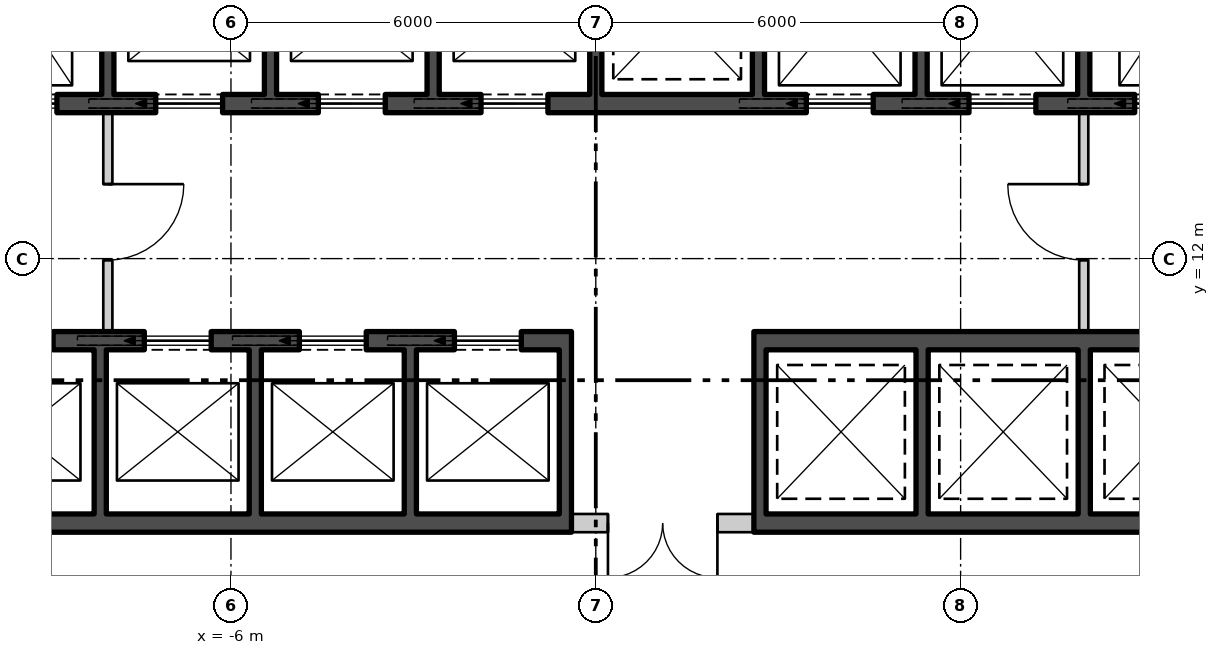
"""IFC4 building model, lengths in metres.
Left out: names, types, materials, properties, quantities, classifications, styles, units other than length and angle.
Written with IfcOpenShell. Run it as: python <this file> out.ifc"""

import sys

from ifc_helpers import new_model, si_unit, direction, frame, frame_2d, origin, place, context, subcontext, project, spatial, polyline, rectangle, outline, extrude, element, fill, save


model = new_model("IFC4")
c1 = context("Model", 3, precision=1e-05, world=origin(), true_north=direction((0.0, 1.0)))
c2 = subcontext(c1, "Body", "Model", "MODEL_VIEW")
j1 = project(units=[si_unit("LENGTHUNIT", "METRE"), si_unit("PLANEANGLEUNIT", "RADIAN")], contexts=[c1])
p1 = place(None, origin())
s1 = spatial("IfcSite", under=j1, at=p1, CompositionType="ELEMENT")
p2 = place(p1, origin())
s2 = spatial("IfcBuilding", under=s1, at=p2, CompositionType="ELEMENT")
p3 = place(p2, frame((0.0, 0.0, 46.8)))
s3 = spatial("IfcBuildingStorey", under=s2, at=p3, CompositionType="ELEMENT", Elevation=46.8)
p4 = place(p3, frame((-28.445, 10.319, -0.18), z_axis=(0.0, 0.0, 1.0), x_axis=(0.499999764979, -0.866025539474, 0.0)))
e1 = element("IfcWall", 1, at=p4, inside=s3, PredefinedType="SOLIDWALL", context=c2, shape_type="SweptSolid", body=[
    extrude(outline(polyline([(-0.13, -0.225), (45.87, -0.225), (45.61, 0.225), (0.13, 0.225), (-0.13, -0.225)])), origin(), (0.0, 0.0, 1.0), 4.28),
])
p5 = place(p4, frame((1.424, 0.0, 1.08)))
e2 = element("IfcOpeningElement", 2, at=p5, cuts=e1, PredefinedType="OPENING", context=c2, shape_type="SweptSolid", body=[
    extrude(rectangle(XDim=2.4, YDim=2.6, at=frame_2d((1.2, 1.3))), frame((0.0, 0.235, 0.0), z_axis=(0.0, -1.0, 0.0), x_axis=(1.0, 0.0, 0.0)), (0.0, 0.0, 1.0), 0.47),
])
p6 = place(p4, frame((5.893, 0.0, 1.08)))
e3 = element("IfcOpeningElement", 3, at=p6, cuts=e1, PredefinedType="OPENING", context=c2, shape_type="SweptSolid", body=[
    extrude(rectangle(XDim=2.4, YDim=2.6, at=frame_2d((1.2, 1.3))), frame((0.0, 0.235, 0.0), z_axis=(0.0, -1.0, 0.0), x_axis=(1.0, 0.0, 0.0)), (0.0, 0.0, 1.0), 0.47),
])
p7 = place(p4, frame((10.401, 0.0, 1.08)))
e4 = element("IfcOpeningElement", 4, at=p7, cuts=e1, PredefinedType="OPENING", context=c2, shape_type="SweptSolid", body=[
    extrude(rectangle(XDim=2.4, YDim=2.6, at=frame_2d((1.2, 1.3))), frame((0.0, 0.235, 0.0), z_axis=(0.0, -1.0, 0.0), x_axis=(1.0, 0.0, 0.0)), (0.0, 0.0, 1.0), 0.47),
])
p8 = place(p4, frame((14.909, 0.0, 1.08)))
e5 = element("IfcOpeningElement", 5, at=p8, cuts=e1, PredefinedType="OPENING", context=c2, shape_type="SweptSolid", body=[
    extrude(rectangle(XDim=2.4, YDim=2.6, at=frame_2d((1.2, 1.3))), frame((0.0, 0.235, 0.0), z_axis=(0.0, -1.0, 0.0), x_axis=(1.0, 0.0, 0.0)), (0.0, 0.0, 1.0), 0.47),
])
p9 = place(p4, frame((19.416, 0.0, 1.08)))
e6 = element("IfcOpeningElement", 6, at=p9, cuts=e1, PredefinedType="OPENING", context=c2, shape_type="SweptSolid", body=[
    extrude(rectangle(XDim=2.4, YDim=2.6, at=frame_2d((1.2, 1.3))), frame((0.0, 0.235, 0.0), z_axis=(0.0, -1.0, 0.0), x_axis=(1.0, 0.0, 0.0)), (0.0, 0.0, 1.0), 0.47),
])
p10 = place(p4, frame((23.924, 0.0, 1.08)))
e7 = element("IfcOpeningElement", 7, at=p10, cuts=e1, PredefinedType="OPENING", context=c2, shape_type="SweptSolid", body=[
    extrude(rectangle(XDim=2.4, YDim=2.6, at=frame_2d((1.2, 1.3))), frame((0.0, 0.235, 0.0), z_axis=(0.0, -1.0, 0.0), x_axis=(1.0, 0.0, 0.0)), (0.0, 0.0, 1.0), 0.47),
])
p11 = place(p4, frame((28.431, 0.0, 1.08)))
e8 = element("IfcOpeningElement", 8, at=p11, cuts=e1, PredefinedType="OPENING", context=c2, shape_type="SweptSolid", body=[
    extrude(rectangle(XDim=2.4, YDim=2.6, at=frame_2d((1.2, 1.3))), frame((0.0, 0.235, 0.0), z_axis=(0.0, -1.0, 0.0), x_axis=(1.0, 0.0, 0.0)), (0.0, 0.0, 1.0), 0.47),
])
p12 = place(p4, frame((32.939, 0.0, 1.08)))
e9 = element("IfcOpeningElement", 9, at=p12, cuts=e1, PredefinedType="OPENING", context=c2, shape_type="SweptSolid", body=[
    extrude(rectangle(XDim=2.4, YDim=2.6, at=frame_2d((1.2, 1.3))), frame((0.0, 0.235, 0.0), z_axis=(0.0, -1.0, 0.0), x_axis=(1.0, 0.0, 0.0)), (0.0, 0.0, 1.0), 0.47),
])
p13 = place(p4, frame((37.447, 0.0, 1.08)))
e10 = element("IfcOpeningElement", 10, at=p13, cuts=e1, PredefinedType="OPENING", context=c2, shape_type="SweptSolid", body=[
    extrude(rectangle(XDim=2.4, YDim=2.6, at=frame_2d((1.2, 1.3))), frame((0.0, 0.235, 0.0), z_axis=(0.0, -1.0, 0.0), x_axis=(1.0, 0.0, 0.0)), (0.0, 0.0, 1.0), 0.47),
])
p14 = place(p4, frame((41.916, 0.0, 1.08)))
e11 = element("IfcOpeningElement", 11, at=p14, cuts=e1, PredefinedType="OPENING", context=c2, shape_type="SweptSolid", body=[
    extrude(rectangle(XDim=2.4, YDim=2.6, at=frame_2d((1.2, 1.3))), frame((0.0, 0.235, 0.0), z_axis=(0.0, -1.0, 0.0), x_axis=(1.0, 0.0, 0.0)), (0.0, 0.0, 1.0), 0.47),
])
p15 = place(p3, frame((5.575, -29.294, -0.18), z_axis=(0.0, 0.0, 1.0), x_axis=(0.499999764979, 0.866025539474, 0.0)))
e12 = element("IfcWall", 12, at=p15, inside=s3, PredefinedType="SOLIDWALL", context=c2, shape_type="SweptSolid", body=[
    extrude(outline(polyline([(-0.13, -0.225), (45.87, -0.225), (45.61, 0.225), (0.13, 0.225), (-0.13, -0.225)])), origin(), (0.0, 0.0, 1.0), 4.28),
])
p16 = place(p15, frame((1.424, 0.0, 1.08)))
e13 = element("IfcOpeningElement", 13, at=p16, cuts=e12, PredefinedType="OPENING", context=c2, shape_type="SweptSolid", body=[
    extrude(rectangle(XDim=2.4, YDim=2.6, at=frame_2d((1.2, 1.3))), frame((0.0, 0.235, 0.0), z_axis=(0.0, -1.0, 0.0), x_axis=(1.0, 0.0, 0.0)), (0.0, 0.0, 1.0), 0.47),
])
p17 = place(p15, frame((5.893, 0.0, 1.08)))
e14 = element("IfcOpeningElement", 14, at=p17, cuts=e12, PredefinedType="OPENING", context=c2, shape_type="SweptSolid", body=[
    extrude(rectangle(XDim=2.4, YDim=2.6, at=frame_2d((1.2, 1.3))), frame((0.0, 0.235, 0.0), z_axis=(0.0, -1.0, 0.0), x_axis=(1.0, 0.0, 0.0)), (0.0, 0.0, 1.0), 0.47),
])
p18 = place(p15, frame((10.401, 0.0, 1.08)))
e15 = element("IfcOpeningElement", 15, at=p18, cuts=e12, PredefinedType="OPENING", context=c2, shape_type="SweptSolid", body=[
    extrude(rectangle(XDim=2.4, YDim=2.6, at=frame_2d((1.2, 1.3))), frame((0.0, 0.235, 0.0), z_axis=(0.0, -1.0, 0.0), x_axis=(1.0, 0.0, 0.0)), (0.0, 0.0, 1.0), 0.47),
])
p19 = place(p15, frame((14.909, 0.0, 1.08)))
e16 = element("IfcOpeningElement", 16, at=p19, cuts=e12, PredefinedType="OPENING", context=c2, shape_type="SweptSolid", body=[
    extrude(rectangle(XDim=2.4, YDim=2.6, at=frame_2d((1.2, 1.3))), frame((0.0, 0.235, 0.0), z_axis=(0.0, -1.0, 0.0), x_axis=(1.0, 0.0, 0.0)), (0.0, 0.0, 1.0), 0.47),
])
p20 = place(p15, frame((19.416, 0.0, 1.08)))
e17 = element("IfcOpeningElement", 17, at=p20, cuts=e12, PredefinedType="OPENING", context=c2, shape_type="SweptSolid", body=[
    extrude(rectangle(XDim=2.4, YDim=2.6, at=frame_2d((1.2, 1.3))), frame((0.0, 0.235, 0.0), z_axis=(0.0, -1.0, 0.0), x_axis=(1.0, 0.0, 0.0)), (0.0, 0.0, 1.0), 0.47),
])
p21 = place(p15, frame((23.924, 0.0, 1.08)))
e18 = element("IfcOpeningElement", 18, at=p21, cuts=e12, PredefinedType="OPENING", context=c2, shape_type="SweptSolid", body=[
    extrude(rectangle(XDim=2.4, YDim=2.6, at=frame_2d((1.2, 1.3))), frame((0.0, 0.235, 0.0), z_axis=(0.0, -1.0, 0.0), x_axis=(1.0, 0.0, 0.0)), (0.0, 0.0, 1.0), 0.47),
])
p22 = place(p15, frame((37.447, 0.0, 1.08)))
e19 = element("IfcOpeningElement", 19, at=p22, cuts=e12, PredefinedType="OPENING", context=c2, shape_type="SweptSolid", body=[
    extrude(rectangle(XDim=2.4, YDim=2.6, at=frame_2d((1.2, 1.3))), frame((0.0, 0.235, 0.0), z_axis=(0.0, -1.0, 0.0), x_axis=(1.0, 0.0, 0.0)), (0.0, 0.0, 1.0), 0.47),
])
p23 = place(p15, frame((41.916, 0.0, 1.08)))
e20 = element("IfcOpeningElement", 20, at=p23, cuts=e12, PredefinedType="OPENING", context=c2, shape_type="SweptSolid", body=[
    extrude(rectangle(XDim=2.4, YDim=2.6, at=frame_2d((1.2, 1.3))), frame((0.0, 0.235, 0.0), z_axis=(0.0, -1.0, 0.0), x_axis=(1.0, 0.0, 0.0)), (0.0, 0.0, 1.0), 0.47),
])
p24 = place(p3, frame((-10.7, 14.55, 0.0), z_axis=(0.0, 0.0, 1.0), x_axis=(1.0, 0.0, 0.0)))
e21 = element("IfcWall", 21, at=p24, inside=s3, PredefinedType="SHEAR", context=c2, shape_type="SweptSolid", body=[
    extrude(rectangle(XDim=21.4, YDim=0.3, at=frame_2d((10.7, 0.0))), origin(), (0.0, 0.0, 1.0), 4.3),
])
p25 = place(p24, frame((0.738, 0.0, 0.0)))
e22 = element("IfcOpeningElement", 22, at=p25, cuts=e21, PredefinedType="OPENING", context=c2, shape_type="SweptSolid", body=[
    extrude(rectangle(XDim=1.1, YDim=2.1, at=frame_2d((0.55, 1.05))), frame((0.0, 0.16, 0.0), z_axis=(0.0, -1.0, 0.0), x_axis=(1.0, 0.0, 0.0)), (0.0, 0.0, 1.0), 0.32),
])
p26 = place(p24, frame((3.462, 0.0, 0.0)))
e23 = element("IfcOpeningElement", 23, at=p26, cuts=e21, PredefinedType="OPENING", context=c2, shape_type="SweptSolid", body=[
    extrude(rectangle(XDim=1.1, YDim=2.1, at=frame_2d((0.55, 1.05))), frame((0.0, 0.16, 0.0), z_axis=(0.0, -1.0, 0.0), x_axis=(1.0, 0.0, 0.0)), (0.0, 0.0, 1.0), 0.32),
])
p27 = place(p24, frame((6.138, 0.0, 0.0)))
e24 = element("IfcOpeningElement", 24, at=p27, cuts=e21, PredefinedType="OPENING", context=c2, shape_type="SweptSolid", body=[
    extrude(rectangle(XDim=1.1, YDim=2.1, at=frame_2d((0.55, 1.05))), frame((0.0, 0.16, 0.0), z_axis=(0.0, -1.0, 0.0), x_axis=(1.0, 0.0, 0.0)), (0.0, 0.0, 1.0), 0.32),
])
p28 = place(p24, frame((8.812, 0.0, 0.0)))
e25 = element("IfcOpeningElement", 25, at=p28, cuts=e21, PredefinedType="OPENING", context=c2, shape_type="SweptSolid", body=[
    extrude(rectangle(XDim=1.1, YDim=2.1, at=frame_2d((0.55, 1.05))), frame((0.0, 0.16, 0.0), z_axis=(0.0, -1.0, 0.0), x_axis=(1.0, 0.0, 0.0)), (0.0, 0.0, 1.0), 0.32),
])
p29 = place(p24, frame((14.162, 0.0, 0.0)))
e26 = element("IfcOpeningElement", 26, at=p29, cuts=e21, PredefinedType="OPENING", context=c2, shape_type="SweptSolid", body=[
    extrude(rectangle(XDim=1.1, YDim=2.1, at=frame_2d((0.55, 1.05))), frame((0.0, 0.16, 0.0), z_axis=(0.0, -1.0, 0.0), x_axis=(1.0, 0.0, 0.0)), (0.0, 0.0, 1.0), 0.32),
])
p30 = place(p24, frame((16.837, 0.0, 0.0)))
e27 = element("IfcOpeningElement", 27, at=p30, cuts=e21, PredefinedType="OPENING", context=c2, shape_type="SweptSolid", body=[
    extrude(rectangle(XDim=1.1, YDim=2.1, at=frame_2d((0.55, 1.05))), frame((0.0, 0.16, 0.0), z_axis=(0.0, -1.0, 0.0), x_axis=(1.0, 0.0, 0.0)), (0.0, 0.0, 1.0), 0.32),
])
p31 = place(p24, frame((19.562, 0.0, 0.0)))
e28 = element("IfcOpeningElement", 28, at=p31, cuts=e21, PredefinedType="OPENING", context=c2, shape_type="SweptSolid", body=[
    extrude(rectangle(XDim=1.1, YDim=2.1, at=frame_2d((0.55, 1.05))), frame((0.0, 0.16, 0.0), z_axis=(0.0, -1.0, 0.0), x_axis=(1.0, 0.0, 0.0)), (0.0, 0.0, 1.0), 0.32),
])
p32 = place(p3, frame((-10.7, 10.65, 0.0), z_axis=(0.0, 0.0, 1.0), x_axis=(1.0, 0.0, 0.0)))
e29 = element("IfcWall", 29, at=p32, inside=s3, PredefinedType="SHEAR", context=c2, shape_type="SweptSolid", body=[
    extrude(rectangle(XDim=10.3, YDim=0.3, at=frame_2d((5.15, 0.0))), origin(), (0.0, 0.0, 1.0), 4.3),
])
p33 = place(p32, frame((0.675, 0.0, 0.0)))
e30 = element("IfcOpeningElement", 30, at=p33, cuts=e29, PredefinedType="OPENING", context=c2, shape_type="SweptSolid", body=[
    extrude(rectangle(XDim=1.1, YDim=2.1, at=frame_2d((0.55, 1.05))), frame((0.0, 0.16, 0.0), z_axis=(0.0, -1.0, 0.0), x_axis=(1.0, 0.0, 0.0)), (0.0, 0.0, 1.0), 0.32),
])
p34 = place(p32, frame((3.275, 0.0, 0.0)))
e31 = element("IfcOpeningElement", 31, at=p34, cuts=e29, PredefinedType="OPENING", context=c2, shape_type="SweptSolid", body=[
    extrude(rectangle(XDim=1.1, YDim=2.1, at=frame_2d((0.55, 1.05))), frame((0.0, 0.16, 0.0), z_axis=(0.0, -1.0, 0.0), x_axis=(1.0, 0.0, 0.0)), (0.0, 0.0, 1.0), 0.32),
])
p35 = place(p32, frame((5.825, 0.0, 0.0)))
e32 = element("IfcOpeningElement", 32, at=p35, cuts=e29, PredefinedType="OPENING", context=c2, shape_type="SweptSolid", body=[
    extrude(rectangle(XDim=1.1, YDim=2.1, at=frame_2d((0.55, 1.05))), frame((0.0, 0.16, 0.0), z_axis=(0.0, -1.0, 0.0), x_axis=(1.0, 0.0, 0.0)), (0.0, 0.0, 1.0), 0.32),
])
p36 = place(p32, frame((8.375, 0.0, 0.0)))
e33 = element("IfcOpeningElement", 33, at=p36, cuts=e29, PredefinedType="OPENING", context=c2, shape_type="SweptSolid", body=[
    extrude(rectangle(XDim=1.1, YDim=2.1, at=frame_2d((0.55, 1.05))), frame((0.0, 0.16, 0.0), z_axis=(0.0, -1.0, 0.0), x_axis=(1.0, 0.0, 0.0)), (0.0, 0.0, 1.0), 0.32),
])
p37 = place(p3, frame((-10.7, 7.65, 0.0), z_axis=(0.0, 0.0, 1.0), x_axis=(1.0, 0.0, 0.0)))
e34 = element("IfcWall", 34, at=p37, inside=s3, PredefinedType="SHEAR", context=c2, shape_type="SweptSolid", body=[
    extrude(rectangle(XDim=10.3, YDim=0.3, at=frame_2d((5.15, 0.0))), origin(), (0.0, 0.0, 1.0), 4.3),
])
for number, where, z_axis, x_axis in (
    (35, (2.6, 10.65, 0.0), (0.0, 0.0, 1.0), (1.0, 0.0, 0.0)),
    (36, (2.6, 7.65, 0.0), (0.0, 0.0, 1.0), (1.0, 0.0, 0.0)),
):
    element("IfcWall", number, at=place(p3, frame(where, z_axis=z_axis, x_axis=x_axis)), inside=s3, PredefinedType="SHEAR", context=c2, shape_type="SweptSolid", body=[
        extrude(rectangle(XDim=8.1, YDim=0.3, at=frame_2d((4.05, 0.0))), origin(), (0.0, 0.0, 1.0), 4.3),
    ])
for number, where, z_axis, x_axis in (
    (37, (-8.025, 14.7, 0.0), (0.0, 0.0, 1.0), (0.0, 1.0, 0.0)),
    (38, (-5.35, 14.7, 0.0), (0.0, 0.0, 1.0), (0.0, 1.0, 0.0)),
    (39, (-2.675, 14.7, 0.0), (0.0, 0.0, 1.0), (0.0, 1.0, 0.0)),
    (40, (0.0, 14.7, 0.0), (0.0, 0.0, 1.0), (0.0, 1.0, 0.0)),
    (41, (2.675, 14.7, 0.0), (0.0, 0.0, 1.0), (0.0, 1.0, 0.0)),
    (42, (5.35, 14.7, 0.0), (0.0, 0.0, 1.0), (0.0, 1.0, 0.0)),
    (43, (8.025, 14.7, 0.0), (0.0, 0.0, 1.0), (0.0, 1.0, 0.0)),
    (44, (-8.15, 7.8, 0.0), (0.0, 0.0, 1.0), (0.0, 1.0, 0.0)),
    (45, (-5.6, 7.8, 0.0), (0.0, 0.0, 1.0), (0.0, 1.0, 0.0)),
    (46, (-3.05, 7.8, 0.0), (0.0, 0.0, 1.0), (0.0, 1.0, 0.0)),
    (47, (-0.5, 7.8, 0.0), (0.0, 0.0, 1.0), (0.0, 1.0, 0.0)),
    (48, (2.7, 7.8, 0.0), (0.0, 0.0, 1.0), (0.0, 1.0, 0.0)),
    (49, (5.367, 7.8, 0.0), (0.0, 0.0, 1.0), (0.0, 1.0, 0.0)),
    (50, (8.033, 7.8, 0.0), (0.0, 0.0, 1.0), (0.0, 1.0, 0.0)),
):
    element("IfcWall", number, at=place(p3, frame(where, z_axis=z_axis, x_axis=x_axis)), inside=s3, PredefinedType="SHEAR", context=c2, shape_type="SweptSolid", body=[
        extrude(rectangle(XDim=2.7, YDim=0.2, at=frame_2d((1.35, 0.0))), origin(), (0.0, 0.0, 1.0), 4.3),
    ])
p38 = place(p3, frame((-8.025, 10.8, 0.0), z_axis=(0.0, 0.0, 1.0), x_axis=(0.0, 1.0, 0.0)))
e51 = element("IfcWall", 51, at=p38, inside=s3, PredefinedType="PARTITIONING", context=c2, shape_type="SweptSolid", body=[
    extrude(rectangle(XDim=3.6, YDim=0.15, at=frame_2d((1.8, 0.0))), origin(), (0.0, 0.0, 1.0), 4.3),
])
p39 = place(p38, frame((1.175, 0.0, 0.0)))
e52 = element("IfcOpeningElement", 52, at=p39, cuts=e51, PredefinedType="OPENING", context=c2, shape_type="SweptSolid", body=[
    extrude(rectangle(XDim=1.25, YDim=2.1, at=frame_2d((0.625, 1.05))), frame((0.0, 0.085, 0.0), z_axis=(0.0, -1.0, 0.0), x_axis=(1.0, 0.0, 0.0)), (0.0, 0.0, 1.0), 0.17),
])
p40 = place(p3, frame((8.025, 10.8, 0.0), z_axis=(0.0, 0.0, 1.0), x_axis=(0.0, 1.0, 0.0)))
e53 = element("IfcWall", 53, at=p40, inside=s3, PredefinedType="PARTITIONING", context=c2, shape_type="SweptSolid", body=[
    extrude(rectangle(XDim=3.6, YDim=0.15, at=frame_2d((1.8, 0.0))), origin(), (0.0, 0.0, 1.0), 4.3),
])
p41 = place(p40, frame((1.175, 0.0, 0.0)))
e54 = element("IfcOpeningElement", 54, at=p41, cuts=e53, PredefinedType="OPENING", context=c2, shape_type="SweptSolid", body=[
    extrude(rectangle(XDim=1.25, YDim=2.1, at=frame_2d((0.625, 1.05))), frame((0.0, 0.085, 0.0), z_axis=(0.0, -1.0, 0.0), x_axis=(1.0, 0.0, 0.0)), (0.0, 0.0, 1.0), 0.17),
])
p42 = place(p3, frame((-0.4, 7.65, 0.0), z_axis=(0.0, 0.0, 1.0), x_axis=(1.0, 0.0, 0.0)))
e55 = element("IfcWall", 55, at=p42, inside=s3, PredefinedType="PARTITIONING", context=c2, shape_type="SweptSolid", body=[
    extrude(rectangle(XDim=3.0, YDim=0.3, at=frame_2d((1.5, 0.0))), origin(), (0.0, 0.0, 1.0), 4.3),
])
p43 = place(p42, frame((0.6, 0.0, 0.0)))
e56 = element("IfcOpeningElement", 56, at=p43, cuts=e55, PredefinedType="OPENING", context=c2, shape_type="SweptSolid", body=[
    extrude(rectangle(XDim=1.8, YDim=2.4, at=frame_2d((0.9, 1.2))), frame((0.0, 0.16, 0.0), z_axis=(0.0, -1.0, 0.0), x_axis=(1.0, 0.0, 0.0)), (0.0, 0.0, 1.0), 0.32),
])
p44 = place(p25, origin())
e57 = element("IfcDoor", 57, at=p44, inside=s3, OperationType="SLIDING_TO_LEFT", PredefinedType="DOOR", context=c2, shape_type="SweptSolid", body=[
    extrude(rectangle(XDim=1.1, YDim=2.1, at=frame_2d((0.55, 1.05))), frame((0.0, 0.025, 0.0), z_axis=(0.0, -1.0, 0.0), x_axis=(1.0, 0.0, 0.0)), (0.0, 0.0, 1.0), 0.05),
])
fill(e22, e57)
p45 = place(p26, origin())
e58 = element("IfcDoor", 58, at=p45, inside=s3, OperationType="SLIDING_TO_LEFT", PredefinedType="DOOR", context=c2, shape_type="SweptSolid", body=[
    extrude(rectangle(XDim=1.1, YDim=2.1, at=frame_2d((0.55, 1.05))), frame((0.0, 0.025, 0.0), z_axis=(0.0, -1.0, 0.0), x_axis=(1.0, 0.0, 0.0)), (0.0, 0.0, 1.0), 0.05),
])
fill(e23, e58)
p46 = place(p27, origin())
e59 = element("IfcDoor", 59, at=p46, inside=s3, OperationType="SLIDING_TO_LEFT", PredefinedType="DOOR", context=c2, shape_type="SweptSolid", body=[
    extrude(rectangle(XDim=1.1, YDim=2.1, at=frame_2d((0.55, 1.05))), frame((0.0, 0.025, 0.0), z_axis=(0.0, -1.0, 0.0), x_axis=(1.0, 0.0, 0.0)), (0.0, 0.0, 1.0), 0.05),
])
fill(e24, e59)
p47 = place(p28, origin())
e60 = element("IfcDoor", 60, at=p47, inside=s3, OperationType="SLIDING_TO_LEFT", PredefinedType="DOOR", context=c2, shape_type="SweptSolid", body=[
    extrude(rectangle(XDim=1.1, YDim=2.1, at=frame_2d((0.55, 1.05))), frame((0.0, 0.025, 0.0), z_axis=(0.0, -1.0, 0.0), x_axis=(1.0, 0.0, 0.0)), (0.0, 0.0, 1.0), 0.05),
])
fill(e25, e60)
p48 = place(p29, origin())
e61 = element("IfcDoor", 61, at=p48, inside=s3, OperationType="SLIDING_TO_LEFT", PredefinedType="DOOR", context=c2, shape_type="SweptSolid", body=[
    extrude(rectangle(XDim=1.1, YDim=2.1, at=frame_2d((0.55, 1.05))), frame((0.0, 0.025, 0.0), z_axis=(0.0, -1.0, 0.0), x_axis=(1.0, 0.0, 0.0)), (0.0, 0.0, 1.0), 0.05),
])
fill(e26, e61)
p49 = place(p30, origin())
e62 = element("IfcDoor", 62, at=p49, inside=s3, OperationType="SLIDING_TO_LEFT", PredefinedType="DOOR", context=c2, shape_type="SweptSolid", body=[
    extrude(rectangle(XDim=1.1, YDim=2.1, at=frame_2d((0.55, 1.05))), frame((0.0, 0.025, 0.0), z_axis=(0.0, -1.0, 0.0), x_axis=(1.0, 0.0, 0.0)), (0.0, 0.0, 1.0), 0.05),
])
fill(e27, e62)
p50 = place(p31, origin())
e63 = element("IfcDoor", 63, at=p50, inside=s3, OperationType="SLIDING_TO_LEFT", PredefinedType="DOOR", context=c2, shape_type="SweptSolid", body=[
    extrude(rectangle(XDim=1.1, YDim=2.1, at=frame_2d((0.55, 1.05))), frame((0.0, 0.025, 0.0), z_axis=(0.0, -1.0, 0.0), x_axis=(1.0, 0.0, 0.0)), (0.0, 0.0, 1.0), 0.05),
])
fill(e28, e63)
p51 = place(p33, origin())
e64 = element("IfcDoor", 64, at=p51, inside=s3, OperationType="SLIDING_TO_LEFT", PredefinedType="DOOR", context=c2, shape_type="SweptSolid", body=[
    extrude(rectangle(XDim=1.1, YDim=2.1, at=frame_2d((0.55, 1.05))), frame((0.0, 0.025, 0.0), z_axis=(0.0, -1.0, 0.0), x_axis=(1.0, 0.0, 0.0)), (0.0, 0.0, 1.0), 0.05),
])
fill(e30, e64)
p52 = place(p34, origin())
e65 = element("IfcDoor", 65, at=p52, inside=s3, OperationType="SLIDING_TO_LEFT", PredefinedType="DOOR", context=c2, shape_type="SweptSolid", body=[
    extrude(rectangle(XDim=1.1, YDim=2.1, at=frame_2d((0.55, 1.05))), frame((0.0, 0.025, 0.0), z_axis=(0.0, -1.0, 0.0), x_axis=(1.0, 0.0, 0.0)), (0.0, 0.0, 1.0), 0.05),
])
fill(e31, e65)
p53 = place(p35, origin())
e66 = element("IfcDoor", 66, at=p53, inside=s3, OperationType="SLIDING_TO_LEFT", PredefinedType="DOOR", context=c2, shape_type="SweptSolid", body=[
    extrude(rectangle(XDim=1.1, YDim=2.1, at=frame_2d((0.55, 1.05))), frame((0.0, 0.025, 0.0), z_axis=(0.0, -1.0, 0.0), x_axis=(1.0, 0.0, 0.0)), (0.0, 0.0, 1.0), 0.05),
])
fill(e32, e66)
p54 = place(p36, origin())
e67 = element("IfcDoor", 67, at=p54, inside=s3, OperationType="SLIDING_TO_LEFT", PredefinedType="DOOR", context=c2, shape_type="SweptSolid", body=[
    extrude(rectangle(XDim=1.1, YDim=2.1, at=frame_2d((0.55, 1.05))), frame((0.0, 0.025, 0.0), z_axis=(0.0, -1.0, 0.0), x_axis=(1.0, 0.0, 0.0)), (0.0, 0.0, 1.0), 0.05),
])
fill(e33, e67)
p55 = place(p39, origin())
e68 = element("IfcDoor", 68, at=p55, inside=s3, OperationType="SINGLE_SWING_RIGHT", PredefinedType="DOOR", context=c2, shape_type="SweptSolid", body=[
    extrude(rectangle(XDim=1.25, YDim=2.1, at=frame_2d((0.625, 1.05))), frame((0.0, 0.025, 0.0), z_axis=(0.0, -1.0, 0.0), x_axis=(1.0, 0.0, 0.0)), (0.0, 0.0, 1.0), 0.05),
])
fill(e52, e68)
p56 = place(p41, origin())
e69 = element("IfcDoor", 69, at=p56, inside=s3, OperationType="SINGLE_SWING_LEFT", PredefinedType="DOOR", context=c2, shape_type="SweptSolid", body=[
    extrude(rectangle(XDim=1.25, YDim=2.1, at=frame_2d((0.625, 1.05))), frame((0.0, 0.025, 0.0), z_axis=(0.0, -1.0, 0.0), x_axis=(1.0, 0.0, 0.0)), (0.0, 0.0, 1.0), 0.05),
])
fill(e54, e69)
p57 = place(p43, origin())
e70 = element("IfcDoor", 70, at=p57, inside=s3, OperationType="DOUBLE_DOOR_SINGLE_SWING", PredefinedType="DOOR", context=c2, shape_type="SweptSolid", body=[
    extrude(rectangle(XDim=1.8, YDim=2.4, at=frame_2d((0.9, 1.2))), frame((0.0, 0.025, 0.0), z_axis=(0.0, -1.0, 0.0), x_axis=(1.0, 0.0, 0.0)), (0.0, 0.0, 1.0), 0.05),
])
fill(e56, e70)
save(model, sys.argv[1])
